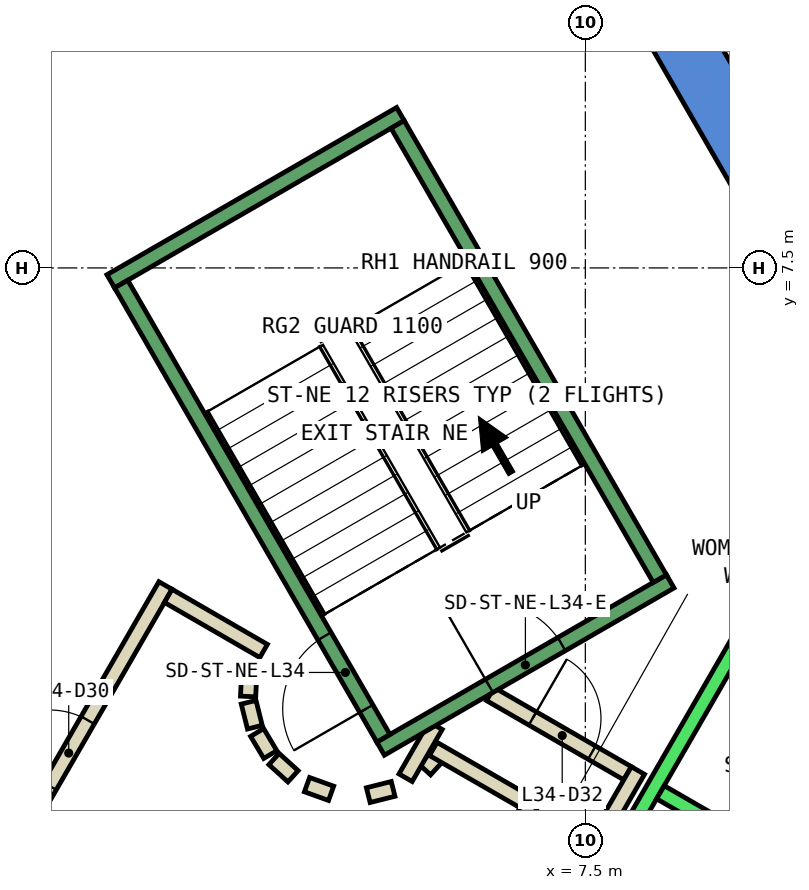
"""IFC4 building model, lengths in metres.
Left out: names, types, materials, properties, quantities, classifications, styles, units other than length and angle.
Written with IfcOpenShell. Run it as: python <this file> out.ifc"""

import sys

from ifc_helpers import new_model, si_unit, direction, frame, frame_2d, origin, place, context, subcontext, project, spatial, polyline, rectangle, outline, extrude, element, fill, save


model = new_model("IFC4")
c1 = context("Model", 3, precision=1e-05, world=origin(), true_north=direction((0.0, 1.0)))
c2 = subcontext(c1, "Body", "Model", "MODEL_VIEW")
j1 = project(units=[si_unit("LENGTHUNIT", "METRE"), si_unit("PLANEANGLEUNIT", "RADIAN")], contexts=[c1])
p1 = place(None, origin())
s1 = spatial("IfcSite", under=j1, at=p1, CompositionType="ELEMENT")
p2 = place(p1, origin())
s2 = spatial("IfcBuilding", under=s1, at=p2, CompositionType="ELEMENT")
p3 = place(p2, frame((0.0, 0.0, 155.0)))
s3 = spatial("IfcBuildingStorey", under=s2, at=p3, CompositionType="ELEMENT", Elevation=155.0)
p4 = place(p3, frame((0.0, 0.0, -0.4)))
e1 = element("IfcWall", 1, at=p4, inside=s3, PredefinedType="SHEAR", context=c2, shape_type="SweptSolid", body=[
    extrude(outline(polyline([(8.517, 11.748), (7.824, 11.348), (12.933, 2.5), (13.856, 2.5), (8.517, 11.748)])), origin(), (0.0, 0.0, 1.0), 4.2),
])
p5 = place(p3, frame((5.39, 0.898, 0.0), z_axis=(0.0, 0.0, 1.0), x_axis=(0.673828488714, 0.738887791073, 0.0)))
e2 = element("IfcWall", 2, at=p5, inside=s3, PredefinedType="PARTITIONING", context=c2, shape_type="SweptSolid", body=[
    extrude(rectangle(XDim=0.263, YDim=0.2, at=frame_2d((0.131, 0.0))), origin(), (0.0, 0.0, 1.0), 3.8),
])
p6 = place(p3, frame((5.499, 1.172, 0.0), z_axis=(0.0, 0.0, 1.0), x_axis=(0.866333505267, -0.499465972466, 0.0)))
e3 = element("IfcWall", 3, at=p6, inside=s3, PredefinedType="PARTITIONING", context=c2, shape_type="SweptSolid", body=[
    extrude(rectangle(XDim=1.374, YDim=0.2, at=frame_2d((0.687, 0.0))), origin(), (0.0, 0.0, 1.0), 3.8),
])
p7 = place(p3, frame((6.826, 0.522, 0.0), z_axis=(0.0, 0.0, 1.0), x_axis=(-0.500016722714, -0.866015748706, 0.0)))
e4 = element("IfcWall", 4, at=p7, inside=s3, PredefinedType="PARTITIONING", context=c2, shape_type="SweptSolid", body=[
    extrude(rectangle(XDim=1.7, YDim=0.2, at=frame_2d((0.85, 0.0))), origin(), (0.0, 0.0, 1.0), 3.8),
])
p8 = place(p3, frame((6.25, 1.894, 0.0), z_axis=(0.0, 0.0, 1.0), x_axis=(0.866043184279, -0.499969202016, 0.0)))
e5 = element("IfcWall", 5, at=p8, inside=s3, PredefinedType="PARTITIONING", context=c2, shape_type="SweptSolid", body=[
    extrude(rectangle(XDim=2.084, YDim=0.2, at=frame_2d((1.042, 0.0))), origin(), (0.0, 0.0, 1.0), 3.8),
])
p9 = place(p8, frame((0.642, 0.0, 0.0)))
e6 = element("IfcOpeningElement", 6, at=p9, cuts=e5, PredefinedType="OPENING", context=c2, shape_type="SweptSolid", body=[
    extrude(rectangle(XDim=0.9, YDim=2.1, at=frame_2d((0.45, 1.05))), frame((0.0, 0.11, 0.0), z_axis=(0.0, -1.0, 0.0), x_axis=(1.0, 0.0, 0.0)), (0.0, 0.0, 1.0), 0.22),
])
p10 = place(p3, frame((8.192, 0.888, 0.0), z_axis=(0.0, 0.0, 1.0), x_axis=(-0.499940625693, -0.866059680843, 0.0)))
e7 = element("IfcWall", 7, at=p10, inside=s3, PredefinedType="PARTITIONING", context=c2, shape_type="SweptSolid", body=[
    extrude(rectangle(XDim=2.68, YDim=0.2, at=frame_2d((1.34, 0.0))), origin(), (0.0, 0.0, 1.0), 3.8),
])
p11 = place(p3, frame((5.135, 0.793, 0.0), z_axis=(0.0, 0.0, 1.0), x_axis=(0.499526442893, 0.866298639529, 0.0)))
e8 = element("IfcWall", 8, at=p11, inside=s3, PredefinedType="PARTITIONING", context=c2, shape_type="SweptSolid", body=[
    extrude(rectangle(XDim=0.791, YDim=0.2, at=frame_2d((0.396, 0.0))), origin(), (0.0, 0.0, 1.0), 3.8),
])
p12 = place(p3, frame((-0.52, -1.0, 0.0), z_axis=(0.0, 0.0, 1.0), x_axis=(0.50011622646, 0.865958290007, 0.0)))
e9 = element("IfcWall", 9, at=p12, inside=s3, PredefinedType="PARTITIONING", context=c2, shape_type="SweptSolid", body=[
    extrude(rectangle(XDim=4.991, YDim=0.2, at=frame_2d((2.496, 0.0))), origin(), (0.0, 0.0, 1.0), 3.8),
])
p13 = place(p12, frame((1.945, 0.0, 0.0)))
e10 = element("IfcOpeningElement", 10, at=p13, cuts=e9, PredefinedType="OPENING", context=c2, shape_type="SweptSolid", body=[
    extrude(rectangle(XDim=1.0, YDim=2.1, at=frame_2d((0.5, 1.05))), frame((0.0, 0.11, 0.0), z_axis=(0.0, -1.0, 0.0), x_axis=(1.0, 0.0, 0.0)), (0.0, 0.0, 1.0), 0.22),
])
p14 = place(p3, frame((2.012, 3.186, 0.0), z_axis=(0.0, 0.0, 1.0), x_axis=(0.865891012941, -0.500232699559, 0.0)))
e11 = element("IfcWall", 11, at=p14, inside=s3, PredefinedType="PARTITIONING", context=c2, shape_type="SweptSolid", body=[
    extrude(rectangle(XDim=1.449, YDim=0.2, at=frame_2d((0.725, 0.0))), origin(), (0.0, 0.0, 1.0), 3.8),
])
p15 = place(p3, frame((3.079, 2.199, 0.0), z_axis=(0.0, 0.0, 1.0), x_axis=(-0.047771483479, -0.998858290933, 0.0)))
e12 = element("IfcWall", 12, at=p15, inside=s3, PredefinedType="PARTITIONING", context=c2, shape_type="SweptSolid", body=[
    extrude(rectangle(XDim=0.337, YDim=0.2, at=frame_2d((0.169, 0.0))), origin(), (0.0, 0.0, 1.0), 3.8),
])
p16 = place(p3, frame((3.07, 1.786, 0.0), z_axis=(0.0, 0.0, 1.0), x_axis=(0.242705583207, -0.970099994784, 0.0)))
e13 = element("IfcWall", 13, at=p16, inside=s3, PredefinedType="PARTITIONING", context=c2, shape_type="SweptSolid", body=[
    extrude(rectangle(XDim=0.338, YDim=0.2, at=frame_2d((0.169, 0.0))), origin(), (0.0, 0.0, 1.0), 3.8),
])
for number, where, z_axis, x_axis in (
    (14, (3.182, 1.388, 0.0), (0.0, 0.0, 1.0), (0.512, -0.859, 0.0)),
    (15, (3.404, 1.039, 0.0), (0.0, 0.0, 1.0), (0.74, -0.672, 0.0)),
):
    element("IfcWall", number, at=place(p3, frame(where, z_axis=z_axis, x_axis=x_axis)), inside=s3, PredefinedType="PARTITIONING", context=c2, shape_type="SweptSolid", body=[
        extrude(rectangle(XDim=0.338, YDim=0.2, at=frame_2d((0.169, 0.0))), origin(), (0.0, 0.0, 1.0), 3.8),
    ])
p17 = place(p3, frame((3.838, 0.702, 0.0), z_axis=(0.0, 0.0, 1.0), x_axis=(0.941035081519, -0.338308993895, 0.0)))
e16 = element("IfcWall", 16, at=p17, inside=s3, PredefinedType="PARTITIONING", context=c2, shape_type="SweptSolid", body=[
    extrude(rectangle(XDim=0.337, YDim=0.2, at=frame_2d((0.168, 0.0))), origin(), (0.0, 0.0, 1.0), 3.8),
])
p18 = place(p3, frame((4.644, 0.564, 0.0), z_axis=(0.0, 0.0, 1.0), x_axis=(0.969929076366, 0.243387729394, 0.0)))
e17 = element("IfcWall", 17, at=p18, inside=s3, PredefinedType="PARTITIONING", context=c2, shape_type="SweptSolid", body=[
    extrude(rectangle(XDim=0.337, YDim=0.2, at=frame_2d((0.168, 0.0))), origin(), (0.0, 0.0, 1.0), 3.8),
])
p19 = place(p3, frame((4.451, -6.19, 0.0), z_axis=(0.0, 0.0, 1.0), x_axis=(0.50000090737, 0.866024879913, 0.0)))
e18 = element("IfcWall", 18, at=p19, inside=s3, PredefinedType="STANDARD", context=c2, shape_type="SweptSolid", body=[
    extrude(rectangle(XDim=10.6, YDim=0.2, at=frame_2d((5.3, 0.0))), origin(), (0.0, 0.0, 1.0), 3.8),
])
p20 = place(p3, frame((8.488, 0.602, 0.0), z_axis=(0.0, 0.0, 1.0), x_axis=(0.866022959057, -0.500004234368, 0.0)))
e19 = element("IfcWall", 19, at=p20, inside=s3, PredefinedType="STANDARD", context=c2, shape_type="SweptSolid", body=[
    extrude(rectangle(XDim=2.5, YDim=0.2, at=frame_2d((1.25, 0.0))), origin(), (0.0, 0.0, 1.0), 3.8),
])
p21 = place(p3, frame((4.806, 1.176, 0.0), z_axis=(0.0, 0.0, 1.0), x_axis=(0.866059941101, 0.499940174841, 0.0)))
e20 = element("IfcWall", 20, at=p21, inside=s3, PredefinedType="STANDARD", context=c2, shape_type="SweptSolid", body=[
    extrude(rectangle(XDim=4.4, YDim=0.2, at=frame_2d((2.2, 0.0))), origin(), (0.0, 0.0, 1.0), 3.8),
])
p22 = place(p21, frame((1.65, 0.0, 0.0)))
e21 = element("IfcOpeningElement", 21, at=p22, cuts=e20, PredefinedType="OPENING", context=c2, shape_type="SweptSolid", body=[
    extrude(rectangle(XDim=1.1, YDim=2.2, at=frame_2d((0.55, 1.1))), frame((0.0, 0.11, 0.0), z_axis=(0.0, -1.0, 0.0), x_axis=(1.0, 0.0, 0.0)), (0.0, 0.0, 1.0), 0.22),
])
p23 = place(p3, frame((1.256, 7.324, 0.0), z_axis=(0.0, 0.0, 1.0), x_axis=(0.866046073146, 0.499964197906, 0.0)))
e22 = element("IfcWall", 22, at=p23, inside=s3, PredefinedType="STANDARD", context=c2, shape_type="SweptSolid", body=[
    extrude(rectangle(XDim=4.4, YDim=0.2, at=frame_2d((2.2, 0.0))), origin(), (0.0, 0.0, 1.0), 3.8),
])
p24 = place(p3, frame((4.843, 1.312, 0.0), z_axis=(0.0, 0.0, 1.0), x_axis=(-0.499963383562, 0.866046543262, 0.0)))
e23 = element("IfcWall", 23, at=p24, inside=s3, PredefinedType="STANDARD", context=c2, shape_type="SweptSolid", body=[
    extrude(rectangle(XDim=6.9, YDim=0.2, at=frame_2d((3.45, 0.0))), origin(), (0.0, 0.0, 1.0), 3.8),
])
p25 = place(p24, frame((0.45, 0.0, 0.0)))
e24 = element("IfcOpeningElement", 24, at=p25, cuts=e23, PredefinedType="OPENING", context=c2, shape_type="SweptSolid", body=[
    extrude(rectangle(XDim=1.1, YDim=2.2, at=frame_2d((0.55, 1.1))), frame((0.0, 0.11, 0.0), z_axis=(0.0, -1.0, 0.0), x_axis=(1.0, 0.0, 0.0)), (0.0, 0.0, 1.0), 0.22),
])
p26 = place(p3, frame((8.48, 3.412, 0.0), z_axis=(0.0, 0.0, 1.0), x_axis=(-0.499978703459, 0.866037698999, 0.0)))
e25 = element("IfcWall", 25, at=p26, inside=s3, PredefinedType="STANDARD", context=c2, shape_type="SweptSolid", body=[
    extrude(rectangle(XDim=6.9, YDim=0.2, at=frame_2d((3.45, 0.0))), origin(), (0.0, 0.0, 1.0), 3.8),
])
p27 = place(p13, origin())
e26 = element("IfcDoor", 26, at=p27, inside=s3, OperationType="SINGLE_SWING_LEFT", PredefinedType="DOOR", context=c2, shape_type="SweptSolid", body=[
    extrude(rectangle(XDim=1.0, YDim=2.1, at=frame_2d((0.5, 1.05))), frame((0.0, 0.025, 0.0), z_axis=(0.0, -1.0, 0.0), x_axis=(1.0, 0.0, 0.0)), (0.0, 0.0, 1.0), 0.05),
])
fill(e10, e26)
p28 = place(p9, origin())
e27 = element("IfcDoor", 27, at=p28, inside=s3, OperationType="SINGLE_SWING_LEFT", PredefinedType="DOOR", context=c2, shape_type="SweptSolid", body=[
    extrude(rectangle(XDim=0.9, YDim=2.1, at=frame_2d((0.45, 1.05))), frame((0.0, 0.025, 0.0), z_axis=(0.0, -1.0, 0.0), x_axis=(1.0, 0.0, 0.0)), (0.0, 0.0, 1.0), 0.05),
])
fill(e6, e27)
p29 = place(p25, origin())
e28 = element("IfcDoor", 28, at=p29, inside=s3, OperationType="SINGLE_SWING_LEFT", PredefinedType="DOOR", context=c2, shape_type="SweptSolid", body=[
    extrude(rectangle(XDim=1.1, YDim=2.2, at=frame_2d((0.55, 1.1))), frame((0.0, 0.025, 0.0), z_axis=(0.0, -1.0, 0.0), x_axis=(1.0, 0.0, 0.0)), (0.0, 0.0, 1.0), 0.05),
])
fill(e24, e28)
p30 = place(p22, origin())
e29 = element("IfcDoor", 29, at=p30, inside=s3, OperationType="SINGLE_SWING_LEFT", PredefinedType="DOOR", context=c2, shape_type="SweptSolid", body=[
    extrude(rectangle(XDim=1.1, YDim=2.2, at=frame_2d((0.55, 1.1))), frame((0.0, 0.025, 0.0), z_axis=(0.0, -1.0, 0.0), x_axis=(1.0, 0.0, 0.0)), (0.0, 0.0, 1.0), 0.05),
])
fill(e21, e29)
save(model, sys.argv[1])
